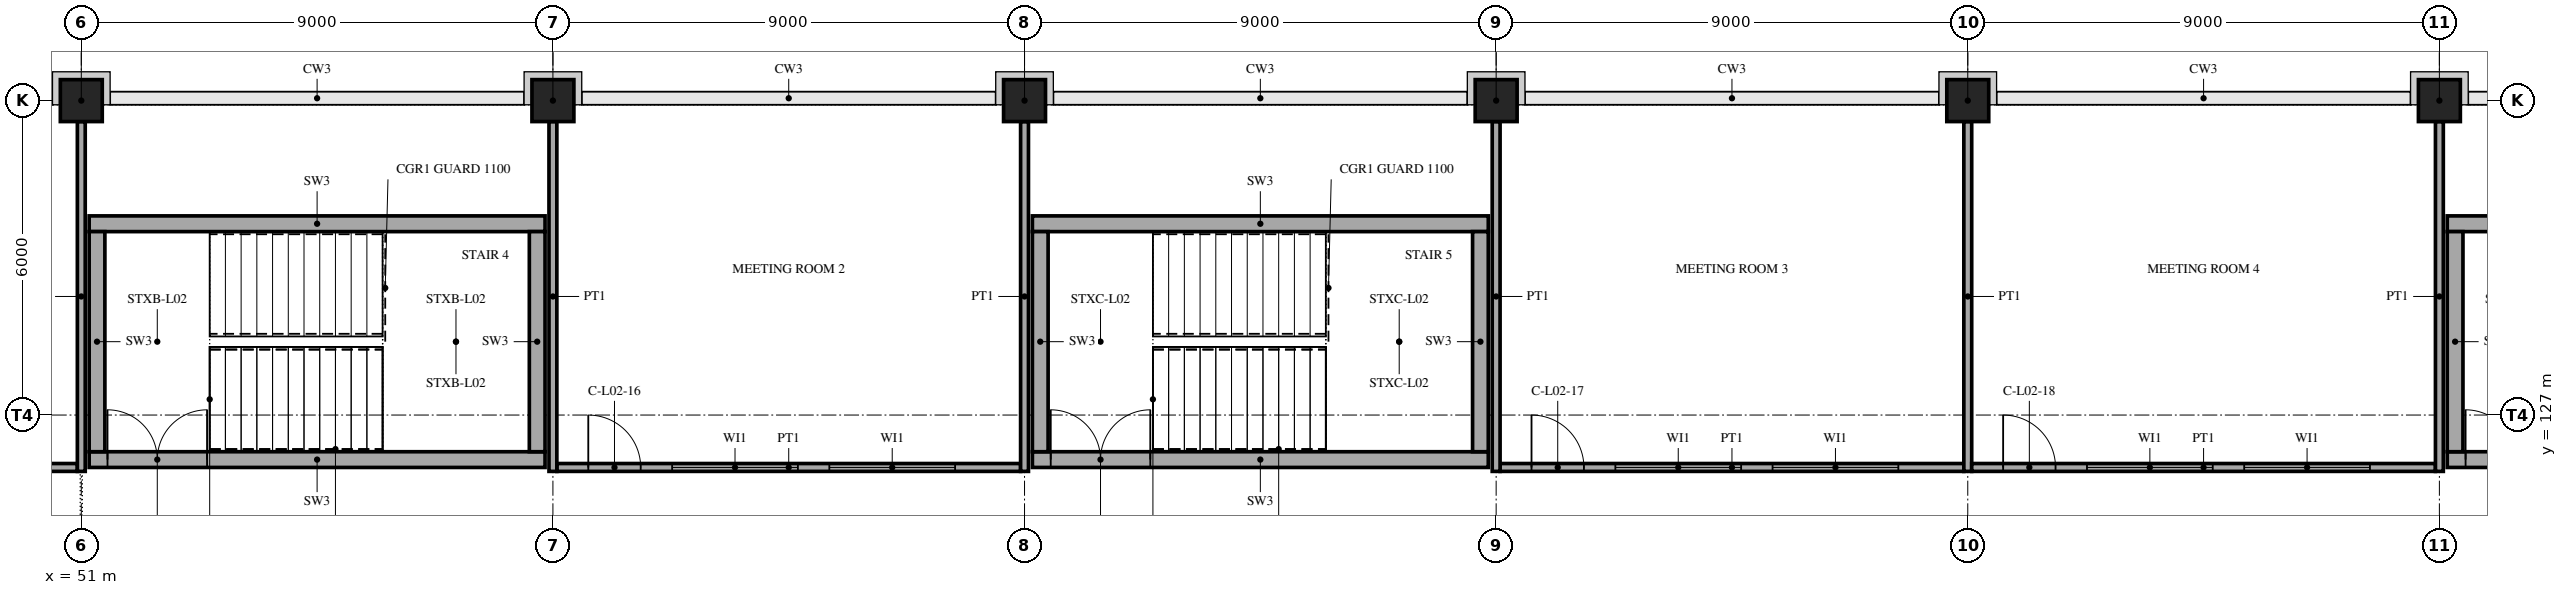
"""IFC4 building model, lengths in metres.
Left out: names, types, materials, properties, quantities, classifications, styles, units other than length and angle.
Written with IfcOpenShell. Run it as: python <this file> out.ifc"""

import sys

from ifc_helpers import new_model, si_unit, direction, frame, frame_2d, origin, origin_2d, place, context, subcontext, project, spatial, rectangle, extrude, element, fill, save


model = new_model("IFC4")
c1 = context("Model", 3, precision=1e-05, world=origin(), true_north=direction((0.0, 1.0)))
c2 = subcontext(c1, "Body", "Model", "MODEL_VIEW")
j1 = project(units=[si_unit("LENGTHUNIT", "METRE"), si_unit("PLANEANGLEUNIT", "RADIAN")], contexts=[c1])
p1 = place(None, origin())
s1 = spatial("IfcSite", under=j1, at=p1, CompositionType="ELEMENT")
p2 = place(p1, origin())
s2 = spatial("IfcBuilding", under=s1, at=p2, CompositionType="ELEMENT")
p3 = place(p2, frame((0.0, 0.0, 10.0)))
s3 = spatial("IfcBuildingStorey", under=s2, at=p3, CompositionType="ELEMENT", Elevation=10.0)
for number, where, z_axis, x_axis in (
    (1, (51.0, 133.0, 0.0), (0.0, 0.0, 1.0), (1.0, 0.0, 0.0)),
    (2, (60.0, 133.0, 0.0), (0.0, 0.0, 1.0), (1.0, 0.0, 0.0)),
    (3, (69.0, 133.0, 0.0), (0.0, 0.0, 1.0), (1.0, 0.0, 0.0)),
    (4, (78.0, 133.0, 0.0), (0.0, 0.0, 1.0), (1.0, 0.0, 0.0)),
    (5, (87.0, 133.0, 0.0), (0.0, 0.0, 1.0), (1.0, 0.0, 0.0)),
    (6, (96.0, 133.0, 0.0), (0.0, 0.0, 1.0), (1.0, 0.0, 0.0)),
):
    element("IfcColumn", number, at=place(p3, frame(where, z_axis=z_axis, x_axis=x_axis)), inside=s3, PredefinedType="COLUMN", context=c2, shape_type="SweptSolid", body=[
        extrude(rectangle(XDim=0.8, YDim=0.8, at=origin_2d()), origin(), (0.0, 0.0, 1.0), 5.0),
    ])
p4 = place(p3, frame((51.15, 126.15, 0.0), z_axis=(0.0, 0.0, 1.0), x_axis=(1.0, 0.0, 0.0)))
e7 = element("IfcWall", 7, at=p4, inside=s3, PredefinedType="SHEAR", context=c2, shape_type="SweptSolid", body=[
    extrude(rectangle(XDim=8.7, YDim=0.3, at=frame_2d((4.35, 0.0))), origin(), (0.0, 0.0, 1.0), 5.0),
])
p5 = place(p4, frame((0.35, 0.0, 0.0)))
e8 = element("IfcOpeningElement", 8, at=p5, cuts=e7, PredefinedType="OPENING", context=c2, shape_type="SweptSolid", body=[
    extrude(rectangle(XDim=1.9, YDim=2.1, at=frame_2d((0.95, 1.05))), frame((0.0, 0.16, 0.0), z_axis=(0.0, -1.0, 0.0), x_axis=(1.0, 0.0, 0.0)), (0.0, 0.0, 1.0), 0.32),
])
p6 = place(p3, frame((51.15, 130.65, 0.0), z_axis=(0.0, 0.0, 1.0), x_axis=(1.0, 0.0, 0.0)))
e9 = element("IfcWall", 9, at=p6, inside=s3, PredefinedType="SHEAR", context=c2, shape_type="SweptSolid", body=[
    extrude(rectangle(XDim=8.7, YDim=0.3, at=frame_2d((4.35, 0.0))), origin(), (0.0, 0.0, 1.0), 5.0),
])
for number, where, z_axis, x_axis in (
    (10, (51.3, 126.3, 0.0), (0.0, 0.0, 1.0), (0.0, 1.0, 0.0)),
    (11, (59.7, 126.3, 0.0), (0.0, 0.0, 1.0), (0.0, 1.0, 0.0)),
):
    element("IfcWall", number, at=place(p3, frame(where, z_axis=z_axis, x_axis=x_axis)), inside=s3, PredefinedType="SHEAR", context=c2, shape_type="SweptSolid", body=[
        extrude(rectangle(XDim=4.2, YDim=0.3, at=frame_2d((2.1, 0.0))), origin(), (0.0, 0.0, 1.0), 5.0),
    ])
p7 = place(p3, frame((69.15, 126.15, 0.0), z_axis=(0.0, 0.0, 1.0), x_axis=(1.0, 0.0, 0.0)))
e12 = element("IfcWall", 12, at=p7, inside=s3, PredefinedType="SHEAR", context=c2, shape_type="SweptSolid", body=[
    extrude(rectangle(XDim=8.7, YDim=0.3, at=frame_2d((4.35, 0.0))), origin(), (0.0, 0.0, 1.0), 5.0),
])
p8 = place(p7, frame((0.35, 0.0, 0.0)))
e13 = element("IfcOpeningElement", 13, at=p8, cuts=e12, PredefinedType="OPENING", context=c2, shape_type="SweptSolid", body=[
    extrude(rectangle(XDim=1.9, YDim=2.1, at=frame_2d((0.95, 1.05))), frame((0.0, 0.16, 0.0), z_axis=(0.0, -1.0, 0.0), x_axis=(1.0, 0.0, 0.0)), (0.0, 0.0, 1.0), 0.32),
])
p9 = place(p3, frame((69.15, 130.65, 0.0), z_axis=(0.0, 0.0, 1.0), x_axis=(1.0, 0.0, 0.0)))
e14 = element("IfcWall", 14, at=p9, inside=s3, PredefinedType="SHEAR", context=c2, shape_type="SweptSolid", body=[
    extrude(rectangle(XDim=8.7, YDim=0.3, at=frame_2d((4.35, 0.0))), origin(), (0.0, 0.0, 1.0), 5.0),
])
for number, where, z_axis, x_axis in (
    (15, (69.3, 126.3, 0.0), (0.0, 0.0, 1.0), (0.0, 1.0, 0.0)),
    (16, (77.7, 126.3, 0.0), (0.0, 0.0, 1.0), (0.0, 1.0, 0.0)),
):
    element("IfcWall", number, at=place(p3, frame(where, z_axis=z_axis, x_axis=x_axis)), inside=s3, PredefinedType="SHEAR", context=c2, shape_type="SweptSolid", body=[
        extrude(rectangle(XDim=4.2, YDim=0.3, at=frame_2d((2.1, 0.0))), origin(), (0.0, 0.0, 1.0), 5.0),
    ])
p10 = place(p3, frame((96.15, 126.15, 0.0), z_axis=(0.0, 0.0, 1.0), x_axis=(1.0, 0.0, 0.0)))
e17 = element("IfcWall", 17, at=p10, inside=s3, PredefinedType="SHEAR", context=c2, shape_type="SweptSolid", body=[
    extrude(rectangle(XDim=8.2, YDim=0.3, at=frame_2d((4.1, 0.0))), origin(), (0.0, 0.0, 1.0), 5.0),
])
p11 = place(p10, frame((0.35, 0.0, 0.0)))
e18 = element("IfcOpeningElement", 18, at=p11, cuts=e17, PredefinedType="OPENING", context=c2, shape_type="SweptSolid", body=[
    extrude(rectangle(XDim=1.9, YDim=2.1, at=frame_2d((0.95, 1.05))), frame((0.0, 0.16, 0.0), z_axis=(0.0, -1.0, 0.0), x_axis=(1.0, 0.0, 0.0)), (0.0, 0.0, 1.0), 0.32),
])
p12 = place(p3, frame((96.15, 130.65, 0.0), z_axis=(0.0, 0.0, 1.0), x_axis=(1.0, 0.0, 0.0)))
e19 = element("IfcWall", 19, at=p12, inside=s3, PredefinedType="SHEAR", context=c2, shape_type="SweptSolid", body=[
    extrude(rectangle(XDim=8.2, YDim=0.3, at=frame_2d((4.1, 0.0))), origin(), (0.0, 0.0, 1.0), 5.0),
])
p13 = place(p3, frame((96.3, 126.3, 0.0), z_axis=(0.0, 0.0, 1.0), x_axis=(0.0, 1.0, 0.0)))
e20 = element("IfcWall", 20, at=p13, inside=s3, PredefinedType="SHEAR", context=c2, shape_type="SweptSolid", body=[
    extrude(rectangle(XDim=4.2, YDim=0.3, at=frame_2d((2.1, 0.0))), origin(), (0.0, 0.0, 1.0), 5.0),
])
p14 = place(p3, frame((42.075, 126.0, 0.0), z_axis=(0.0, 0.0, 1.0), x_axis=(1.0, 0.0, 0.0)))
e21 = element("IfcWall", 21, at=p14, inside=s3, PredefinedType="PARTITIONING", context=c2, shape_type="SweptSolid", body=[
    extrude(rectangle(XDim=8.85, YDim=0.15, at=frame_2d((4.425, 0.0))), origin(), (0.0, 0.0, 1.0), 4.8),
])
p15 = place(p14, frame((0.6, 0.0, 0.0)))
e22 = element("IfcOpeningElement", 22, at=p15, cuts=e21, PredefinedType="OPENING", context=c2, shape_type="SweptSolid", body=[
    extrude(rectangle(XDim=1.0, YDim=2.1, at=frame_2d((0.5, 1.05))), frame((0.0, 0.085, 0.0), z_axis=(0.0, -1.0, 0.0), x_axis=(1.0, 0.0, 0.0)), (0.0, 0.0, 1.0), 0.17),
])
p16 = place(p14, frame((2.2, 0.0, 0.9)))
e23 = element("IfcOpeningElement", 23, at=p16, cuts=e21, PredefinedType="OPENING", context=c2, shape_type="SweptSolid", body=[
    extrude(rectangle(XDim=2.4, YDim=1.5, at=frame_2d((1.2, 0.75))), frame((0.0, 0.085, 0.0), z_axis=(0.0, -1.0, 0.0), x_axis=(1.0, 0.0, 0.0)), (0.0, 0.0, 1.0), 0.17),
])
p17 = place(p14, frame((5.2, 0.0, 0.9)))
e24 = element("IfcOpeningElement", 24, at=p17, cuts=e21, PredefinedType="OPENING", context=c2, shape_type="SweptSolid", body=[
    extrude(rectangle(XDim=2.4, YDim=1.5, at=frame_2d((1.2, 0.75))), frame((0.0, 0.085, 0.0), z_axis=(0.0, -1.0, 0.0), x_axis=(1.0, 0.0, 0.0)), (0.0, 0.0, 1.0), 0.17),
])
p18 = place(p3, frame((51.0, 125.925, 0.0), z_axis=(0.0, 0.0, 1.0), x_axis=(0.0, 1.0, 0.0)))
e25 = element("IfcWall", 25, at=p18, inside=s3, PredefinedType="PARTITIONING", context=c2, shape_type="SweptSolid", body=[
    extrude(rectangle(XDim=6.675, YDim=0.15, at=frame_2d((3.337, 0.0))), origin(), (0.0, 0.0, 1.0), 4.0),
])
p19 = place(p3, frame((60.075, 126.0, 0.0), z_axis=(0.0, 0.0, 1.0), x_axis=(1.0, 0.0, 0.0)))
e26 = element("IfcWall", 26, at=p19, inside=s3, PredefinedType="PARTITIONING", context=c2, shape_type="SweptSolid", body=[
    extrude(rectangle(XDim=8.85, YDim=0.15, at=frame_2d((4.425, 0.0))), origin(), (0.0, 0.0, 1.0), 4.8),
])
p20 = place(p19, frame((0.6, 0.0, 0.0)))
e27 = element("IfcOpeningElement", 27, at=p20, cuts=e26, PredefinedType="OPENING", context=c2, shape_type="SweptSolid", body=[
    extrude(rectangle(XDim=1.0, YDim=2.1, at=frame_2d((0.5, 1.05))), frame((0.0, 0.085, 0.0), z_axis=(0.0, -1.0, 0.0), x_axis=(1.0, 0.0, 0.0)), (0.0, 0.0, 1.0), 0.17),
])
p21 = place(p19, frame((2.2, 0.0, 0.9)))
e28 = element("IfcOpeningElement", 28, at=p21, cuts=e26, PredefinedType="OPENING", context=c2, shape_type="SweptSolid", body=[
    extrude(rectangle(XDim=2.4, YDim=1.5, at=frame_2d((1.2, 0.75))), frame((0.0, 0.085, 0.0), z_axis=(0.0, -1.0, 0.0), x_axis=(1.0, 0.0, 0.0)), (0.0, 0.0, 1.0), 0.17),
])
p22 = place(p19, frame((5.2, 0.0, 0.9)))
e29 = element("IfcOpeningElement", 29, at=p22, cuts=e26, PredefinedType="OPENING", context=c2, shape_type="SweptSolid", body=[
    extrude(rectangle(XDim=2.4, YDim=1.5, at=frame_2d((1.2, 0.75))), frame((0.0, 0.085, 0.0), z_axis=(0.0, -1.0, 0.0), x_axis=(1.0, 0.0, 0.0)), (0.0, 0.0, 1.0), 0.17),
])
for number, where, z_axis, x_axis in (
    (30, (60.0, 125.925, 0.0), (0.0, 0.0, 1.0), (0.0, 1.0, 0.0)),
    (31, (69.0, 125.925, 0.0), (0.0, 0.0, 1.0), (0.0, 1.0, 0.0)),
):
    element("IfcWall", number, at=place(p3, frame(where, z_axis=z_axis, x_axis=x_axis)), inside=s3, PredefinedType="PARTITIONING", context=c2, shape_type="SweptSolid", body=[
        extrude(rectangle(XDim=6.675, YDim=0.15, at=frame_2d((3.337, 0.0))), origin(), (0.0, 0.0, 1.0), 4.0),
    ])
p23 = place(p3, frame((78.075, 126.0, 0.0), z_axis=(0.0, 0.0, 1.0), x_axis=(1.0, 0.0, 0.0)))
e32 = element("IfcWall", 32, at=p23, inside=s3, PredefinedType="PARTITIONING", context=c2, shape_type="SweptSolid", body=[
    extrude(rectangle(XDim=8.85, YDim=0.15, at=frame_2d((4.425, 0.0))), origin(), (0.0, 0.0, 1.0), 4.8),
])
p24 = place(p23, frame((0.6, 0.0, 0.0)))
e33 = element("IfcOpeningElement", 33, at=p24, cuts=e32, PredefinedType="OPENING", context=c2, shape_type="SweptSolid", body=[
    extrude(rectangle(XDim=1.0, YDim=2.1, at=frame_2d((0.5, 1.05))), frame((0.0, 0.085, 0.0), z_axis=(0.0, -1.0, 0.0), x_axis=(1.0, 0.0, 0.0)), (0.0, 0.0, 1.0), 0.17),
])
p25 = place(p23, frame((2.2, 0.0, 0.9)))
e34 = element("IfcOpeningElement", 34, at=p25, cuts=e32, PredefinedType="OPENING", context=c2, shape_type="SweptSolid", body=[
    extrude(rectangle(XDim=2.4, YDim=1.5, at=frame_2d((1.2, 0.75))), frame((0.0, 0.085, 0.0), z_axis=(0.0, -1.0, 0.0), x_axis=(1.0, 0.0, 0.0)), (0.0, 0.0, 1.0), 0.17),
])
p26 = place(p23, frame((5.2, 0.0, 0.9)))
e35 = element("IfcOpeningElement", 35, at=p26, cuts=e32, PredefinedType="OPENING", context=c2, shape_type="SweptSolid", body=[
    extrude(rectangle(XDim=2.4, YDim=1.5, at=frame_2d((1.2, 0.75))), frame((0.0, 0.085, 0.0), z_axis=(0.0, -1.0, 0.0), x_axis=(1.0, 0.0, 0.0)), (0.0, 0.0, 1.0), 0.17),
])
for number, where, z_axis, x_axis in (
    (36, (78.0, 125.925, 0.0), (0.0, 0.0, 1.0), (0.0, 1.0, 0.0)),
    (37, (87.0, 125.925, 0.0), (0.0, 0.0, 1.0), (0.0, 1.0, 0.0)),
):
    element("IfcWall", number, at=place(p3, frame(where, z_axis=z_axis, x_axis=x_axis)), inside=s3, PredefinedType="PARTITIONING", context=c2, shape_type="SweptSolid", body=[
        extrude(rectangle(XDim=6.675, YDim=0.15, at=frame_2d((3.337, 0.0))), origin(), (0.0, 0.0, 1.0), 4.0),
    ])
p27 = place(p3, frame((87.075, 126.0, 0.0), z_axis=(0.0, 0.0, 1.0), x_axis=(1.0, 0.0, 0.0)))
e38 = element("IfcWall", 38, at=p27, inside=s3, PredefinedType="PARTITIONING", context=c2, shape_type="SweptSolid", body=[
    extrude(rectangle(XDim=8.85, YDim=0.15, at=frame_2d((4.425, 0.0))), origin(), (0.0, 0.0, 1.0), 4.8),
])
p28 = place(p27, frame((0.6, 0.0, 0.0)))
e39 = element("IfcOpeningElement", 39, at=p28, cuts=e38, PredefinedType="OPENING", context=c2, shape_type="SweptSolid", body=[
    extrude(rectangle(XDim=1.0, YDim=2.1, at=frame_2d((0.5, 1.05))), frame((0.0, 0.085, 0.0), z_axis=(0.0, -1.0, 0.0), x_axis=(1.0, 0.0, 0.0)), (0.0, 0.0, 1.0), 0.17),
])
p29 = place(p27, frame((2.2, 0.0, 0.9)))
e40 = element("IfcOpeningElement", 40, at=p29, cuts=e38, PredefinedType="OPENING", context=c2, shape_type="SweptSolid", body=[
    extrude(rectangle(XDim=2.4, YDim=1.5, at=frame_2d((1.2, 0.75))), frame((0.0, 0.085, 0.0), z_axis=(0.0, -1.0, 0.0), x_axis=(1.0, 0.0, 0.0)), (0.0, 0.0, 1.0), 0.17),
])
p30 = place(p27, frame((5.2, 0.0, 0.9)))
e41 = element("IfcOpeningElement", 41, at=p30, cuts=e38, PredefinedType="OPENING", context=c2, shape_type="SweptSolid", body=[
    extrude(rectangle(XDim=2.4, YDim=1.5, at=frame_2d((1.2, 0.75))), frame((0.0, 0.085, 0.0), z_axis=(0.0, -1.0, 0.0), x_axis=(1.0, 0.0, 0.0)), (0.0, 0.0, 1.0), 0.17),
])
p31 = place(p3, frame((96.0, 125.925, 0.0), z_axis=(0.0, 0.0, 1.0), x_axis=(0.0, 1.0, 0.0)))
e42 = element("IfcWall", 42, at=p31, inside=s3, PredefinedType="PARTITIONING", context=c2, shape_type="SweptSolid", body=[
    extrude(rectangle(XDim=6.675, YDim=0.15, at=frame_2d((3.337, 0.0))), origin(), (0.0, 0.0, 1.0), 4.0),
])
p32 = place(p5, origin())
e43 = element("IfcDoor", 43, at=p32, inside=s3, OperationType="DOUBLE_DOOR_SINGLE_SWING", PredefinedType="NOTDEFINED", context=c2, shape_type="SweptSolid", body=[
    extrude(rectangle(XDim=1.9, YDim=2.1, at=frame_2d((0.95, 1.05))), frame((0.0, 0.025, 0.0), z_axis=(0.0, -1.0, 0.0), x_axis=(1.0, 0.0, 0.0)), (0.0, 0.0, 1.0), 0.05),
])
fill(e8, e43)
p33 = place(p8, origin())
e44 = element("IfcDoor", 44, at=p33, inside=s3, OperationType="DOUBLE_DOOR_SINGLE_SWING", PredefinedType="NOTDEFINED", context=c2, shape_type="SweptSolid", body=[
    extrude(rectangle(XDim=1.9, YDim=2.1, at=frame_2d((0.95, 1.05))), frame((0.0, 0.025, 0.0), z_axis=(0.0, -1.0, 0.0), x_axis=(1.0, 0.0, 0.0)), (0.0, 0.0, 1.0), 0.05),
])
fill(e13, e44)
p34 = place(p11, origin())
e45 = element("IfcDoor", 45, at=p34, inside=s3, OperationType="DOUBLE_DOOR_SINGLE_SWING", PredefinedType="NOTDEFINED", context=c2, shape_type="SweptSolid", body=[
    extrude(rectangle(XDim=1.9, YDim=2.1, at=frame_2d((0.95, 1.05))), frame((0.0, 0.025, 0.0), z_axis=(0.0, -1.0, 0.0), x_axis=(1.0, 0.0, 0.0)), (0.0, 0.0, 1.0), 0.05),
])
fill(e18, e45)
p35 = place(p20, origin())
e46 = element("IfcDoor", 46, at=p35, inside=s3, OperationType="SINGLE_SWING_LEFT", PredefinedType="NOTDEFINED", context=c2, shape_type="SweptSolid", body=[
    extrude(rectangle(XDim=1.0, YDim=2.1, at=frame_2d((0.5, 1.05))), frame((0.0, 0.025, 0.0), z_axis=(0.0, -1.0, 0.0), x_axis=(1.0, 0.0, 0.0)), (0.0, 0.0, 1.0), 0.05),
])
fill(e27, e46)
p36 = place(p21, origin())
e47 = element("IfcWindow", 47, at=p36, inside=s3, PartitioningType="SINGLE_PANEL", PredefinedType="WINDOW", context=c2, shape_type="SweptSolid", body=[
    extrude(rectangle(XDim=2.4, YDim=1.5, at=frame_2d((1.2, 0.75))), frame((0.0, 0.03, 0.0), z_axis=(0.0, -1.0, 0.0), x_axis=(1.0, 0.0, 0.0)), (0.0, 0.0, 1.0), 0.06),
])
fill(e28, e47)
p37 = place(p22, origin())
e48 = element("IfcWindow", 48, at=p37, inside=s3, PartitioningType="SINGLE_PANEL", PredefinedType="WINDOW", context=c2, shape_type="SweptSolid", body=[
    extrude(rectangle(XDim=2.4, YDim=1.5, at=frame_2d((1.2, 0.75))), frame((0.0, 0.03, 0.0), z_axis=(0.0, -1.0, 0.0), x_axis=(1.0, 0.0, 0.0)), (0.0, 0.0, 1.0), 0.06),
])
fill(e29, e48)
p38 = place(p24, origin())
e49 = element("IfcDoor", 49, at=p38, inside=s3, OperationType="SINGLE_SWING_LEFT", PredefinedType="NOTDEFINED", context=c2, shape_type="SweptSolid", body=[
    extrude(rectangle(XDim=1.0, YDim=2.1, at=frame_2d((0.5, 1.05))), frame((0.0, 0.025, 0.0), z_axis=(0.0, -1.0, 0.0), x_axis=(1.0, 0.0, 0.0)), (0.0, 0.0, 1.0), 0.05),
])
fill(e33, e49)
p39 = place(p25, origin())
e50 = element("IfcWindow", 50, at=p39, inside=s3, PartitioningType="SINGLE_PANEL", PredefinedType="WINDOW", context=c2, shape_type="SweptSolid", body=[
    extrude(rectangle(XDim=2.4, YDim=1.5, at=frame_2d((1.2, 0.75))), frame((0.0, 0.03, 0.0), z_axis=(0.0, -1.0, 0.0), x_axis=(1.0, 0.0, 0.0)), (0.0, 0.0, 1.0), 0.06),
])
fill(e34, e50)
p40 = place(p26, origin())
e51 = element("IfcWindow", 51, at=p40, inside=s3, PartitioningType="SINGLE_PANEL", PredefinedType="WINDOW", context=c2, shape_type="SweptSolid", body=[
    extrude(rectangle(XDim=2.4, YDim=1.5, at=frame_2d((1.2, 0.75))), frame((0.0, 0.03, 0.0), z_axis=(0.0, -1.0, 0.0), x_axis=(1.0, 0.0, 0.0)), (0.0, 0.0, 1.0), 0.06),
])
fill(e35, e51)
p41 = place(p28, origin())
e52 = element("IfcDoor", 52, at=p41, inside=s3, OperationType="SINGLE_SWING_LEFT", PredefinedType="NOTDEFINED", context=c2, shape_type="SweptSolid", body=[
    extrude(rectangle(XDim=1.0, YDim=2.1, at=frame_2d((0.5, 1.05))), frame((0.0, 0.025, 0.0), z_axis=(0.0, -1.0, 0.0), x_axis=(1.0, 0.0, 0.0)), (0.0, 0.0, 1.0), 0.05),
])
fill(e39, e52)
p42 = place(p29, origin())
e53 = element("IfcWindow", 53, at=p42, inside=s3, PartitioningType="SINGLE_PANEL", PredefinedType="WINDOW", context=c2, shape_type="SweptSolid", body=[
    extrude(rectangle(XDim=2.4, YDim=1.5, at=frame_2d((1.2, 0.75))), frame((0.0, 0.03, 0.0), z_axis=(0.0, -1.0, 0.0), x_axis=(1.0, 0.0, 0.0)), (0.0, 0.0, 1.0), 0.06),
])
fill(e40, e53)
p43 = place(p30, origin())
e54 = element("IfcWindow", 54, at=p43, inside=s3, PartitioningType="SINGLE_PANEL", PredefinedType="WINDOW", context=c2, shape_type="SweptSolid", body=[
    extrude(rectangle(XDim=2.4, YDim=1.5, at=frame_2d((1.2, 0.75))), frame((0.0, 0.03, 0.0), z_axis=(0.0, -1.0, 0.0), x_axis=(1.0, 0.0, 0.0)), (0.0, 0.0, 1.0), 0.06),
])
fill(e41, e54)
save(model, sys.argv[1])
